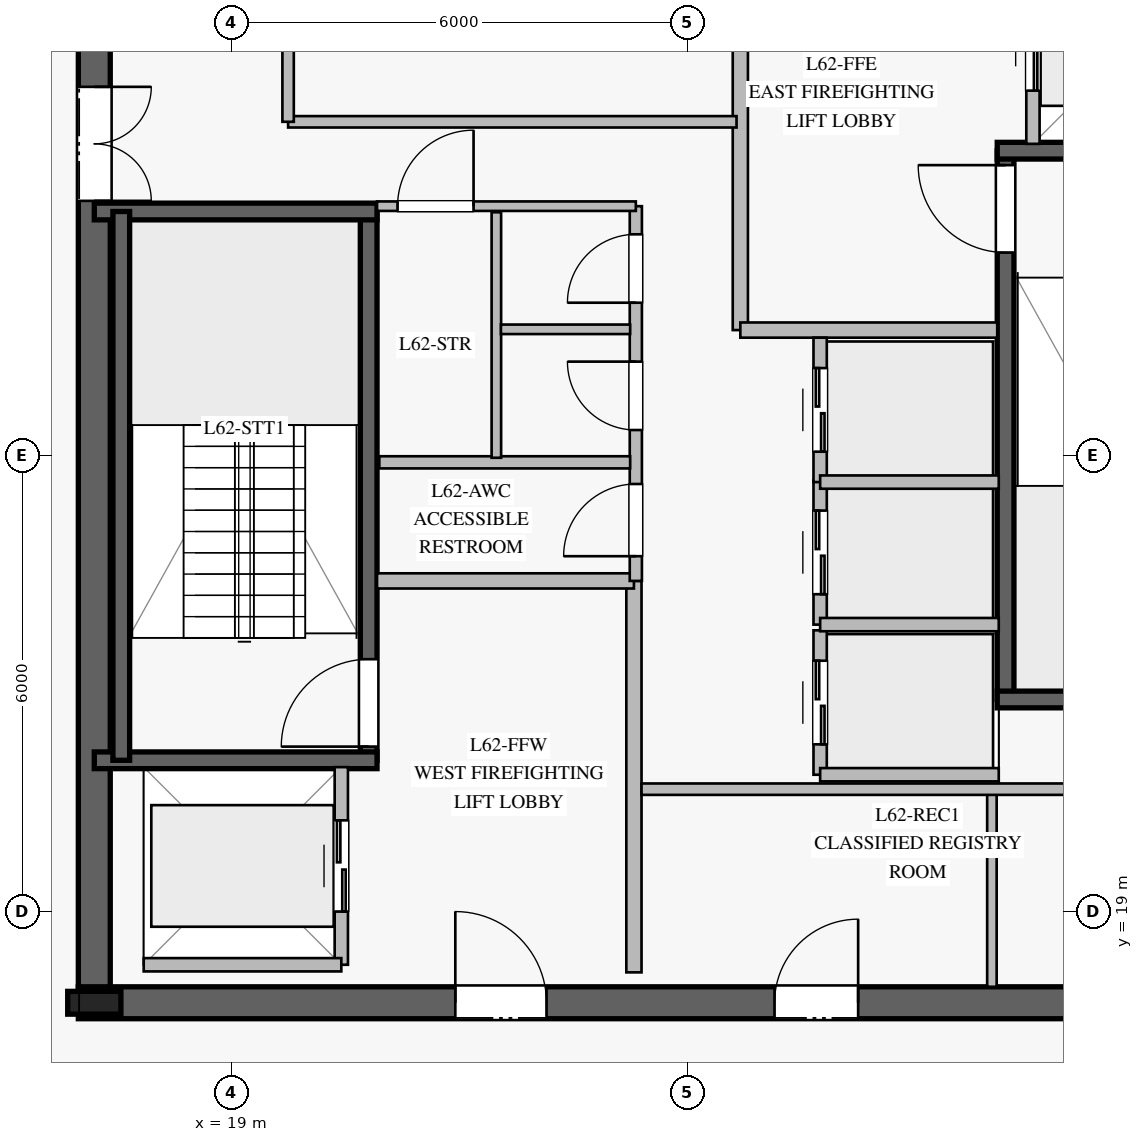
"""IFC4 building model, lengths in metres.
Left out: names, types, materials, properties, quantities, classifications, styles, units other than length and angle.
Written with IfcOpenShell. Run it as: python <this file> out.ifc"""

import sys

from ifc_helpers import new_model, si_unit, direction, frame, frame_2d, origin, origin_2d, place, context, subcontext, project, spatial, rectangle, i_section, extrude, element, fill, save


model = new_model("IFC4")
c1 = context("Model", 3, precision=1e-05, world=origin(), true_north=direction((0.0, 1.0)))
c2 = subcontext(c1, "Body", "Model", "MODEL_VIEW")
j1 = project(units=[si_unit("LENGTHUNIT", "METRE"), si_unit("PLANEANGLEUNIT", "RADIAN")], contexts=[c1])
p1 = place(None, origin())
s1 = spatial("IfcSite", under=j1, at=p1, CompositionType="ELEMENT")
p2 = place(p1, origin())
s2 = spatial("IfcBuilding", under=s1, at=p2, CompositionType="ELEMENT")
p3 = place(p2, frame((0.0, 0.0, 258.2)))
s3 = spatial("IfcBuildingStorey", under=s2, at=p3, CompositionType="ELEMENT", Elevation=258.2)
p4 = place(p3, frame((16.99, 17.8, 0.0), z_axis=(0.0, 0.0, 1.0), x_axis=(1.0, 0.0, 0.0)))
e1 = element("IfcWall", 1, at=p4, inside=s3, PredefinedType="SHEAR", context=c2, shape_type="SweptSolid", body=[
    extrude(rectangle(XDim=16.02, YDim=0.42, at=frame_2d((8.01, 0.0))), origin(), (0.0, 0.0, 1.0), 3.78),
])
p5 = place(p4, frame((4.96, 0.0, 0.0)))
e2 = element("IfcOpeningElement", 2, at=p5, cuts=e1, PredefinedType="OPENING", context=c2, shape_type="SweptSolid", body=[
    extrude(rectangle(XDim=1.2, YDim=2.25, at=frame_2d((0.6, 1.125))), frame((0.0, 0.22, 0.0), z_axis=(0.0, -1.0, 0.0), x_axis=(1.0, 0.0, 0.0)), (0.0, 0.0, 1.0), 0.44),
])
p6 = place(p4, frame((13.91, 0.0, 0.0)))
e3 = element("IfcOpeningElement", 3, at=p6, cuts=e1, PredefinedType="OPENING", context=c2, shape_type="SweptSolid", body=[
    extrude(rectangle(XDim=0.9, YDim=2.1, at=frame_2d((0.45, 1.05))), frame((0.0, 0.22, 0.0), z_axis=(0.0, -1.0, 0.0), x_axis=(1.0, 0.0, 0.0)), (0.0, 0.0, 1.0), 0.44),
])
p7 = place(p4, frame((9.16, 0.0, 0.0)))
e4 = element("IfcOpeningElement", 4, at=p7, cuts=e1, PredefinedType="OPENING", context=c2, shape_type="SweptSolid", body=[
    extrude(rectangle(XDim=1.1, YDim=2.2, at=frame_2d((0.55, 1.1))), frame((0.0, 0.22, 0.0), z_axis=(0.0, -1.0, 0.0), x_axis=(1.0, 0.0, 0.0)), (0.0, 0.0, 1.0), 0.44),
])
p8 = place(p3, frame((17.2, 31.99, 0.0), z_axis=(0.0, 0.0, 1.0), x_axis=(0.0, -1.0, 0.0)))
e5 = element("IfcWall", 5, at=p8, inside=s3, PredefinedType="SHEAR", context=c2, shape_type="SweptSolid", body=[
    extrude(rectangle(XDim=13.98, YDim=0.42, at=frame_2d((6.99, 0.0))), origin(), (0.0, 0.0, 1.0), 3.78),
])
p9 = place(p8, frame((2.14, 0.0, 0.0)))
e6 = element("IfcOpeningElement", 6, at=p9, cuts=e5, PredefinedType="OPENING", context=c2, shape_type="SweptSolid", body=[
    extrude(rectangle(XDim=1.5, YDim=2.2, at=frame_2d((0.75, 1.1))), frame((0.0, 0.22, 0.0), z_axis=(0.0, -1.0, 0.0), x_axis=(1.0, 0.0, 0.0)), (0.0, 0.0, 1.0), 0.44),
])
p10 = place(p3, frame((17.2, 17.8, 0.0), z_axis=(0.0, 0.0, 1.0), x_axis=(1.0, 0.0, 0.0)))
e7 = element("IfcColumn", 7, at=p10, inside=s3, PredefinedType="COLUMN", context=c2, shape_type="SweptSolid", body=[
    extrude(i_section(OverallWidth=0.3, OverallDepth=0.7, WebThickness=0.017, FlangeThickness=0.032, at=origin_2d()), origin(), (0.0, 0.0, 1.0), 4.0),
])
p11 = place(p3, frame((20.81, 20.99, 0.0), z_axis=(0.0, 0.0, 1.0), x_axis=(0.0, 1.0, 0.0)))
e8 = element("IfcWall", 8, at=p11, inside=s3, PredefinedType="SOLIDWALL", context=c2, shape_type="SweptSolid", body=[
    extrude(rectangle(XDim=7.22, YDim=0.22, at=frame_2d((3.61, 0.0))), origin(), (0.0, 0.0, 1.0), 3.78),
])
p12 = place(p11, frame((0.18, 0.0, 0.0)))
e9 = element("IfcOpeningElement", 9, at=p12, cuts=e8, PredefinedType="OPENING", context=c2, shape_type="SweptSolid", body=[
    extrude(rectangle(XDim=1.15, YDim=2.2, at=frame_2d((0.575, 1.1))), frame((0.0, 0.12, 0.0), z_axis=(0.0, -1.0, 0.0), x_axis=(1.0, 0.0, 0.0)), (0.0, 0.0, 1.0), 0.24),
])
for number, where, z_axis, x_axis in (
    (10, (17.2, 20.99, 0.0), (0.0, 0.0, 1.0), (1.0, 0.0, 0.0)),
    (11, (17.2, 28.21, 0.0), (0.0, 0.0, 1.0), (1.0, 0.0, 0.0)),
):
    element("IfcWall", number, at=place(p3, frame(where, z_axis=z_axis, x_axis=x_axis)), inside=s3, PredefinedType="SOLIDWALL", context=c2, shape_type="SweptSolid", body=[
        extrude(rectangle(XDim=3.72, YDim=0.22, at=frame_2d((1.86, 0.0))), origin(), (0.0, 0.0, 1.0), 3.78),
    ])
p13 = place(p3, frame((17.555, 28.21, 0.0), z_axis=(0.0, 0.0, 1.0), x_axis=(0.0, -1.0, 0.0)))
e12 = element("IfcWall", 12, at=p13, inside=s3, PredefinedType="SOLIDWALL", context=c2, shape_type="SweptSolid", body=[
    extrude(rectangle(XDim=7.22, YDim=0.22, at=frame_2d((3.61, 0.0))), origin(), (0.0, 0.0, 1.0), 3.78),
])
p14 = place(p3, frame((29.19, 21.79, 0.0), z_axis=(0.0, 0.0, 1.0), x_axis=(0.0, 1.0, 0.0)))
e13 = element("IfcWall", 13, at=p14, inside=s3, PredefinedType="SOLIDWALL", context=c2, shape_type="SweptSolid", body=[
    extrude(rectangle(XDim=7.22, YDim=0.22, at=frame_2d((3.61, 0.0))), origin(), (0.0, 0.0, 1.0), 3.78),
])
p15 = place(p14, frame((5.88, 0.0, 0.0)))
e14 = element("IfcOpeningElement", 14, at=p15, cuts=e13, PredefinedType="OPENING", context=c2, shape_type="SweptSolid", body=[
    extrude(rectangle(XDim=1.15, YDim=2.2, at=frame_2d((0.575, 1.1))), frame((0.0, 0.12, 0.0), z_axis=(0.0, -1.0, 0.0), x_axis=(1.0, 0.0, 0.0)), (0.0, 0.0, 1.0), 0.24),
])
for number, where, z_axis, x_axis in (
    (15, (29.08, 21.79, 0.0), (0.0, 0.0, 1.0), (1.0, 0.0, 0.0)),
    (16, (29.08, 29.01, 0.0), (0.0, 0.0, 1.0), (1.0, 0.0, 0.0)),
):
    element("IfcWall", number, at=place(p3, frame(where, z_axis=z_axis, x_axis=x_axis)), inside=s3, PredefinedType="SOLIDWALL", context=c2, shape_type="SweptSolid", body=[
        extrude(rectangle(XDim=3.72, YDim=0.22, at=frame_2d((1.86, 0.0))), origin(), (0.0, 0.0, 1.0), 3.78),
    ])
p16 = place(p3, frame((24.3, 18.2, 0.0), z_axis=(0.0, 0.0, 1.0), x_axis=(0.0, 1.0, 0.0)))
e17 = element("IfcWall", 17, at=p16, inside=s3, PredefinedType="PARTITIONING", context=c2, shape_type="SweptSolid", body=[
    extrude(rectangle(XDim=5.15, YDim=0.2, at=frame_2d((2.575, 0.0))), origin(), (0.0, 0.0, 1.0), 3.78),
])
p17 = place(p3, frame((20.92, 23.35, 0.0), z_axis=(0.0, 0.0, 1.0), x_axis=(1.0, 0.0, 0.0)))
e18 = element("IfcWall", 18, at=p17, inside=s3, PredefinedType="PARTITIONING", context=c2, shape_type="SweptSolid", body=[
    extrude(rectangle(XDim=3.38, YDim=0.2, at=frame_2d((1.69, 0.0))), origin(), (0.0, 0.0, 1.0), 3.78),
])
p18 = place(p3, frame((25.7, 26.65, 0.0), z_axis=(0.0, 0.0, 1.0), x_axis=(0.0, 1.0, 0.0)))
e19 = element("IfcWall", 19, at=p18, inside=s3, PredefinedType="PARTITIONING", context=c2, shape_type="SweptSolid", body=[
    extrude(rectangle(XDim=5.15, YDim=0.2, at=frame_2d((2.575, 0.0))), origin(), (0.0, 0.0, 1.0), 3.78),
])
p19 = place(p3, frame((25.7, 26.65, 0.0), z_axis=(0.0, 0.0, 1.0), x_axis=(1.0, 0.0, 0.0)))
e20 = element("IfcWall", 20, at=p19, inside=s3, PredefinedType="PARTITIONING", context=c2, shape_type="SweptSolid", body=[
    extrude(rectangle(XDim=3.38, YDim=0.2, at=frame_2d((1.69, 0.0))), origin(), (0.0, 0.0, 1.0), 3.78),
])
p20 = place(p3, frame((24.325, 23.35, 0.0), z_axis=(0.0, 0.0, 1.0), x_axis=(0.0, 1.0, 0.0)))
e21 = element("IfcWall", 21, at=p20, inside=s3, PredefinedType="PLUMBINGWALL", context=c2, shape_type="SweptSolid", body=[
    extrude(rectangle(XDim=4.93, YDim=0.16, at=frame_2d((2.465, 0.0))), origin(), (0.0, 0.0, 1.0), 3.78),
])
p21 = place(p20, frame((0.325, 0.0, 0.0)))
e22 = element("IfcOpeningElement", 22, at=p21, cuts=e21, PredefinedType="OPENING", context=c2, shape_type="SweptSolid", body=[
    extrude(rectangle(XDim=0.95, YDim=2.1, at=frame_2d((0.475, 1.05))), frame((0.0, 0.09, 0.0), z_axis=(0.0, -1.0, 0.0), x_axis=(1.0, 0.0, 0.0)), (0.0, 0.0, 1.0), 0.18),
])
p22 = place(p20, frame((1.985, 0.0, 0.0)))
e23 = element("IfcOpeningElement", 23, at=p22, cuts=e21, PredefinedType="OPENING", context=c2, shape_type="SweptSolid", body=[
    extrude(rectangle(XDim=0.9, YDim=2.1, at=frame_2d((0.45, 1.05))), frame((0.0, 0.09, 0.0), z_axis=(0.0, -1.0, 0.0), x_axis=(1.0, 0.0, 0.0)), (0.0, 0.0, 1.0), 0.18),
])
p23 = place(p20, frame((3.66, 0.0, 0.0)))
e24 = element("IfcOpeningElement", 24, at=p23, cuts=e21, PredefinedType="OPENING", context=c2, shape_type="SweptSolid", body=[
    extrude(rectangle(XDim=0.9, YDim=2.1, at=frame_2d((0.45, 1.05))), frame((0.0, 0.09, 0.0), z_axis=(0.0, -1.0, 0.0), x_axis=(1.0, 0.0, 0.0)), (0.0, 0.0, 1.0), 0.18),
])
p24 = place(p3, frame((20.92, 28.28, 0.0), z_axis=(0.0, 0.0, 1.0), x_axis=(1.0, 0.0, 0.0)))
e25 = element("IfcWall", 25, at=p24, inside=s3, PredefinedType="PARTITIONING", context=c2, shape_type="SweptSolid", body=[
    extrude(rectangle(XDim=3.405, YDim=0.125, at=frame_2d((1.703, 0.0))), origin(), (0.0, 0.0, 1.0), 3.78),
])
p25 = place(p24, frame((0.27, 0.0, 0.0)))
e26 = element("IfcOpeningElement", 26, at=p25, cuts=e25, PredefinedType="OPENING", context=c2, shape_type="SweptSolid", body=[
    extrude(rectangle(XDim=1.0, YDim=2.15, at=frame_2d((0.5, 1.075))), frame((0.0, 0.073, 0.0), z_axis=(0.0, -1.0, 0.0), x_axis=(1.0, 0.0, 0.0)), (0.0, 0.0, 1.0), 0.145),
])
p26 = place(p3, frame((29.01, 18.01, 0.0), z_axis=(0.0, 0.0, 1.0), x_axis=(0.0, 1.0, 0.0)))
e27 = element("IfcWall", 27, at=p26, inside=s3, PredefinedType="PARTITIONING", context=c2, shape_type="SweptSolid", body=[
    extrude(rectangle(XDim=2.54, YDim=0.125, at=frame_2d((1.27, 0.0))), origin(), (0.0, 0.0, 1.0), 3.78),
])
p27 = place(p3, frame((20.95, 24.91, 0.0), z_axis=(0.0, 0.0, 1.0), x_axis=(1.0, 0.0, 0.0)))
e28 = element("IfcWall", 28, at=p27, inside=s3, PredefinedType="PLUMBINGWALL", context=c2, shape_type="SweptSolid", body=[
    extrude(rectangle(XDim=3.3, YDim=0.16, at=frame_2d((1.65, 0.0))), origin(), (0.0, 0.0, 1.0), 3.78),
])
p28 = place(p3, frame((22.49, 24.97, 0.0), z_axis=(0.0, 0.0, 1.0), x_axis=(0.0, 1.0, 0.0)))
e29 = element("IfcWall", 29, at=p28, inside=s3, PredefinedType="PARTITIONING", context=c2, shape_type="SweptSolid", body=[
    extrude(rectangle(XDim=3.23, YDim=0.125, at=frame_2d((1.615, 0.0))), origin(), (0.0, 0.0, 1.0), 3.78),
])
p29 = place(p3, frame((22.55, 26.66, 0.0), z_axis=(0.0, 0.0, 1.0), x_axis=(1.0, 0.0, 0.0)))
e30 = element("IfcWall", 30, at=p29, inside=s3, PredefinedType="PARTITIONING", context=c2, shape_type="SweptSolid", body=[
    extrude(rectangle(XDim=1.7, YDim=0.125, at=frame_2d((0.85, 0.0))), origin(), (0.0, 0.0, 1.0), 3.78),
])
p30 = place(p3, frame((24.4, 20.61, 0.0), z_axis=(0.0, 0.0, 1.0), x_axis=(1.0, 0.0, 0.0)))
e31 = element("IfcWall", 31, at=p30, inside=s3, PredefinedType="PARTITIONING", context=c2, shape_type="SweptSolid", body=[
    extrude(rectangle(XDim=5.9, YDim=0.15, at=frame_2d((2.95, 0.0))), origin(), (0.0, 0.0, 1.0), 3.78),
])
p31 = place(p3, frame((19.75, 29.39, 0.0), z_axis=(0.0, 0.0, 1.0), x_axis=(1.0, 0.0, 0.0)))
e32 = element("IfcWall", 32, at=p31, inside=s3, PredefinedType="PARTITIONING", context=c2, shape_type="SweptSolid", body=[
    extrude(rectangle(XDim=5.9, YDim=0.15, at=frame_2d((2.95, 0.0))), origin(), (0.0, 0.0, 1.0), 3.78),
])
p32 = place(p3, frame((19.75, 29.39, 0.0), z_axis=(0.0, 0.0, 1.0), x_axis=(0.0, 1.0, 0.0)))
e33 = element("IfcWall", 33, at=p32, inside=s3, PredefinedType="PARTITIONING", context=c2, shape_type="SweptSolid", body=[
    extrude(rectangle(XDim=2.41, YDim=0.15, at=frame_2d((1.205, 0.0))), origin(), (0.0, 0.0, 1.0), 3.78),
])
p33 = place(p3, frame((26.75, 20.8, 0.0), z_axis=(0.0, 0.0, 1.0), x_axis=(0.0, 1.0, 0.0)))
e34 = element("IfcWall", 34, at=p33, inside=s3, PredefinedType="PARTITIONING", context=c2, shape_type="SweptSolid", body=[
    extrude(rectangle(XDim=1.9, YDim=0.175, at=frame_2d((0.95, 0.0))), origin(), (0.0, 0.0, 1.0), 3.78),
])
p34 = place(p33, frame((0.4, 0.0, 0.0)))
e35 = element("IfcOpeningElement", 35, at=p34, cuts=e34, PredefinedType="OPENING", context=c2, shape_type="SweptSolid", body=[
    extrude(rectangle(XDim=1.1, YDim=2.2, at=frame_2d((0.55, 1.1))), frame((0.0, 0.098, 0.0), z_axis=(0.0, -1.0, 0.0), x_axis=(1.0, 0.0, 0.0)), (0.0, 0.0, 1.0), 0.195),
])
p35 = place(p3, frame((26.75, 20.8, 0.0), z_axis=(0.0, 0.0, 1.0), x_axis=(1.0, 0.0, 0.0)))
e36 = element("IfcWall", 36, at=p35, inside=s3, PredefinedType="PARTITIONING", context=c2, shape_type="SweptSolid", body=[
    extrude(rectangle(XDim=2.35, YDim=0.175, at=frame_2d((1.175, 0.0))), origin(), (0.0, 0.0, 1.0), 3.78),
])
p36 = place(p3, frame((26.75, 22.775, 0.0), z_axis=(0.0, 0.0, 1.0), x_axis=(0.0, 1.0, 0.0)))
e37 = element("IfcWall", 37, at=p36, inside=s3, PredefinedType="PARTITIONING", context=c2, shape_type="SweptSolid", body=[
    extrude(rectangle(XDim=1.9, YDim=0.175, at=frame_2d((0.95, 0.0))), origin(), (0.0, 0.0, 1.0), 3.78),
])
p37 = place(p36, frame((0.4, 0.0, 0.0)))
e38 = element("IfcOpeningElement", 38, at=p37, cuts=e37, PredefinedType="OPENING", context=c2, shape_type="SweptSolid", body=[
    extrude(rectangle(XDim=1.1, YDim=2.2, at=frame_2d((0.55, 1.1))), frame((0.0, 0.098, 0.0), z_axis=(0.0, -1.0, 0.0), x_axis=(1.0, 0.0, 0.0)), (0.0, 0.0, 1.0), 0.195),
])
p38 = place(p3, frame((26.75, 22.775, 0.0), z_axis=(0.0, 0.0, 1.0), x_axis=(1.0, 0.0, 0.0)))
e39 = element("IfcWall", 39, at=p38, inside=s3, PredefinedType="PARTITIONING", context=c2, shape_type="SweptSolid", body=[
    extrude(rectangle(XDim=2.35, YDim=0.175, at=frame_2d((1.175, 0.0))), origin(), (0.0, 0.0, 1.0), 3.78),
])
p39 = place(p3, frame((26.75, 24.65, 0.0), z_axis=(0.0, 0.0, 1.0), x_axis=(0.0, 1.0, 0.0)))
e40 = element("IfcWall", 40, at=p39, inside=s3, PredefinedType="PARTITIONING", context=c2, shape_type="SweptSolid", body=[
    extrude(rectangle(XDim=1.9, YDim=0.175, at=frame_2d((0.95, 0.0))), origin(), (0.0, 0.0, 1.0), 3.78),
])
p40 = place(p39, frame((0.4, 0.0, 0.0)))
e41 = element("IfcOpeningElement", 41, at=p40, cuts=e40, PredefinedType="OPENING", context=c2, shape_type="SweptSolid", body=[
    extrude(rectangle(XDim=1.1, YDim=2.2, at=frame_2d((0.55, 1.1))), frame((0.0, 0.098, 0.0), z_axis=(0.0, -1.0, 0.0), x_axis=(1.0, 0.0, 0.0)), (0.0, 0.0, 1.0), 0.195),
])
p41 = place(p3, frame((26.75, 24.65, 0.0), z_axis=(0.0, 0.0, 1.0), x_axis=(1.0, 0.0, 0.0)))
e42 = element("IfcWall", 42, at=p41, inside=s3, PredefinedType="PARTITIONING", context=c2, shape_type="SweptSolid", body=[
    extrude(rectangle(XDim=2.35, YDim=0.175, at=frame_2d((1.175, 0.0))), origin(), (0.0, 0.0, 1.0), 3.78),
])
p42 = place(p3, frame((20.45, 18.3, 0.0), z_axis=(0.0, 0.0, 1.0), x_axis=(0.0, 1.0, 0.0)))
e43 = element("IfcWall", 43, at=p42, inside=s3, PredefinedType="PARTITIONING", context=c2, shape_type="SweptSolid", body=[
    extrude(rectangle(XDim=2.6, YDim=0.175, at=frame_2d((1.3, 0.0))), origin(), (0.0, 0.0, 1.0), 3.78),
])
p43 = place(p42, frame((0.7, 0.0, 0.0)))
e44 = element("IfcOpeningElement", 44, at=p43, cuts=e43, PredefinedType="OPENING", context=c2, shape_type="SweptSolid", body=[
    extrude(rectangle(XDim=1.2, YDim=2.2, at=frame_2d((0.6, 1.1))), frame((0.0, 0.098, 0.0), z_axis=(0.0, -1.0, 0.0), x_axis=(1.0, 0.0, 0.0)), (0.0, 0.0, 1.0), 0.195),
])
p44 = place(p3, frame((17.85, 18.3, 0.0), z_axis=(0.0, 0.0, 1.0), x_axis=(1.0, 0.0, 0.0)))
e45 = element("IfcWall", 45, at=p44, inside=s3, PredefinedType="PARTITIONING", context=c2, shape_type="SweptSolid", body=[
    extrude(rectangle(XDim=2.6, YDim=0.175, at=frame_2d((1.3, 0.0))), origin(), (0.0, 0.0, 1.0), 3.78),
])
p45 = place(p3, frame((29.55, 29.1, 0.0), z_axis=(0.0, 0.0, 1.0), x_axis=(0.0, 1.0, 0.0)))
e46 = element("IfcWall", 46, at=p45, inside=s3, PredefinedType="PARTITIONING", context=c2, shape_type="SweptSolid", body=[
    extrude(rectangle(XDim=2.6, YDim=0.175, at=frame_2d((1.3, 0.0))), origin(), (0.0, 0.0, 1.0), 3.78),
])
p46 = place(p45, frame((0.7, 0.0, 0.0)))
e47 = element("IfcOpeningElement", 47, at=p46, cuts=e46, PredefinedType="OPENING", context=c2, shape_type="SweptSolid", body=[
    extrude(rectangle(XDim=1.2, YDim=2.2, at=frame_2d((0.6, 1.1))), frame((0.0, 0.098, 0.0), z_axis=(0.0, -1.0, 0.0), x_axis=(1.0, 0.0, 0.0)), (0.0, 0.0, 1.0), 0.195),
])
p47 = place(p12, origin())
e48 = element("IfcDoor", 48, at=p47, inside=s3, OperationType="SINGLE_SWING_LEFT", PredefinedType="DOOR", context=c2, shape_type="SweptSolid", body=[
    extrude(rectangle(XDim=1.15, YDim=2.2, at=frame_2d((0.575, 1.1))), frame((0.0, 0.025, 0.0), z_axis=(0.0, -1.0, 0.0), x_axis=(1.0, 0.0, 0.0)), (0.0, 0.0, 1.0), 0.05),
])
fill(e9, e48)
p48 = place(p15, origin())
e49 = element("IfcDoor", 49, at=p48, inside=s3, OperationType="SINGLE_SWING_RIGHT", PredefinedType="DOOR", context=c2, shape_type="SweptSolid", body=[
    extrude(rectangle(XDim=1.15, YDim=2.2, at=frame_2d((0.575, 1.1))), frame((0.0, 0.025, 0.0), z_axis=(0.0, -1.0, 0.0), x_axis=(1.0, 0.0, 0.0)), (0.0, 0.0, 1.0), 0.05),
])
fill(e14, e49)
p49 = place(p5, origin())
e50 = element("IfcDoor", 50, at=p49, inside=s3, OperationType="SINGLE_SWING_LEFT", PredefinedType="DOOR", context=c2, shape_type="SweptSolid", body=[
    extrude(rectangle(XDim=1.2, YDim=2.25, at=frame_2d((0.6, 1.125))), frame((0.0, 0.025, 0.0), z_axis=(0.0, -1.0, 0.0), x_axis=(1.0, 0.0, 0.0)), (0.0, 0.0, 1.0), 0.05),
])
fill(e2, e50)
p50 = place(p9, origin())
e51 = element("IfcDoor", 51, at=p50, inside=s3, OperationType="DOUBLE_DOOR_SINGLE_SWING", PredefinedType="DOOR", context=c2, shape_type="SweptSolid", body=[
    extrude(rectangle(XDim=1.5, YDim=2.2, at=frame_2d((0.75, 1.1))), frame((0.0, 0.025, 0.0), z_axis=(0.0, -1.0, 0.0), x_axis=(1.0, 0.0, 0.0)), (0.0, 0.0, 1.0), 0.05),
])
fill(e6, e51)
p51 = place(p21, origin())
e52 = element("IfcDoor", 52, at=p51, inside=s3, OperationType="SINGLE_SWING_LEFT", PredefinedType="DOOR", context=c2, shape_type="SweptSolid", body=[
    extrude(rectangle(XDim=0.95, YDim=2.1, at=frame_2d((0.475, 1.05))), frame((0.0, 0.025, 0.0), z_axis=(0.0, -1.0, 0.0), x_axis=(1.0, 0.0, 0.0)), (0.0, 0.0, 1.0), 0.05),
])
fill(e22, e52)
p52 = place(p22, origin())
e53 = element("IfcDoor", 53, at=p52, inside=s3, OperationType="SINGLE_SWING_RIGHT", PredefinedType="DOOR", context=c2, shape_type="SweptSolid", body=[
    extrude(rectangle(XDim=0.9, YDim=2.1, at=frame_2d((0.45, 1.05))), frame((0.0, 0.025, 0.0), z_axis=(0.0, -1.0, 0.0), x_axis=(1.0, 0.0, 0.0)), (0.0, 0.0, 1.0), 0.05),
])
fill(e23, e53)
p53 = place(p23, origin())
e54 = element("IfcDoor", 54, at=p53, inside=s3, OperationType="SINGLE_SWING_LEFT", PredefinedType="DOOR", context=c2, shape_type="SweptSolid", body=[
    extrude(rectangle(XDim=0.9, YDim=2.1, at=frame_2d((0.45, 1.05))), frame((0.0, 0.025, 0.0), z_axis=(0.0, -1.0, 0.0), x_axis=(1.0, 0.0, 0.0)), (0.0, 0.0, 1.0), 0.05),
])
fill(e24, e54)
p54 = place(p25, origin())
e55 = element("IfcDoor", 55, at=p54, inside=s3, OperationType="SINGLE_SWING_RIGHT", PredefinedType="DOOR", context=c2, shape_type="SweptSolid", body=[
    extrude(rectangle(XDim=1.0, YDim=2.15, at=frame_2d((0.5, 1.075))), frame((0.0, 0.025, 0.0), z_axis=(0.0, -1.0, 0.0), x_axis=(1.0, 0.0, 0.0)), (0.0, 0.0, 1.0), 0.05),
])
fill(e26, e55)
p55 = place(p7, origin())
e56 = element("IfcDoor", 56, at=p55, inside=s3, OperationType="SINGLE_SWING_RIGHT", PredefinedType="DOOR", context=c2, shape_type="SweptSolid", body=[
    extrude(rectangle(XDim=1.1, YDim=2.2, at=frame_2d((0.55, 1.1))), frame((0.0, 0.025, 0.0), z_axis=(0.0, -1.0, 0.0), x_axis=(1.0, 0.0, 0.0)), (0.0, 0.0, 1.0), 0.05),
])
fill(e4, e56)
p56 = place(p34, origin())
e57 = element("IfcDoor", 57, at=p56, inside=s3, OperationType="DOUBLE_DOOR_SLIDING", PredefinedType="DOOR", context=c2, shape_type="SweptSolid", body=[
    extrude(rectangle(XDim=1.1, YDim=2.2, at=frame_2d((0.55, 1.1))), frame((0.0, 0.025, 0.0), z_axis=(0.0, -1.0, 0.0), x_axis=(1.0, 0.0, 0.0)), (0.0, 0.0, 1.0), 0.05),
])
fill(e35, e57)
p57 = place(p37, origin())
e58 = element("IfcDoor", 58, at=p57, inside=s3, OperationType="DOUBLE_DOOR_SLIDING", PredefinedType="DOOR", context=c2, shape_type="SweptSolid", body=[
    extrude(rectangle(XDim=1.1, YDim=2.2, at=frame_2d((0.55, 1.1))), frame((0.0, 0.025, 0.0), z_axis=(0.0, -1.0, 0.0), x_axis=(1.0, 0.0, 0.0)), (0.0, 0.0, 1.0), 0.05),
])
fill(e38, e58)
p58 = place(p40, origin())
e59 = element("IfcDoor", 59, at=p58, inside=s3, OperationType="DOUBLE_DOOR_SLIDING", PredefinedType="DOOR", context=c2, shape_type="SweptSolid", body=[
    extrude(rectangle(XDim=1.1, YDim=2.2, at=frame_2d((0.55, 1.1))), frame((0.0, 0.025, 0.0), z_axis=(0.0, -1.0, 0.0), x_axis=(1.0, 0.0, 0.0)), (0.0, 0.0, 1.0), 0.05),
])
fill(e41, e59)
p59 = place(p43, origin())
e60 = element("IfcDoor", 60, at=p59, inside=s3, OperationType="DOUBLE_DOOR_SLIDING", PredefinedType="DOOR", context=c2, shape_type="SweptSolid", body=[
    extrude(rectangle(XDim=1.2, YDim=2.2, at=frame_2d((0.6, 1.1))), frame((0.0, 0.025, 0.0), z_axis=(0.0, -1.0, 0.0), x_axis=(1.0, 0.0, 0.0)), (0.0, 0.0, 1.0), 0.05),
])
fill(e44, e60)
p60 = place(p46, origin())
e61 = element("IfcDoor", 61, at=p60, inside=s3, OperationType="DOUBLE_DOOR_SLIDING", PredefinedType="DOOR", context=c2, shape_type="SweptSolid", body=[
    extrude(rectangle(XDim=1.2, YDim=2.2, at=frame_2d((0.6, 1.1))), frame((0.0, 0.025, 0.0), z_axis=(0.0, -1.0, 0.0), x_axis=(1.0, 0.0, 0.0)), (0.0, 0.0, 1.0), 0.05),
])
fill(e47, e61)
save(model, sys.argv[1])
